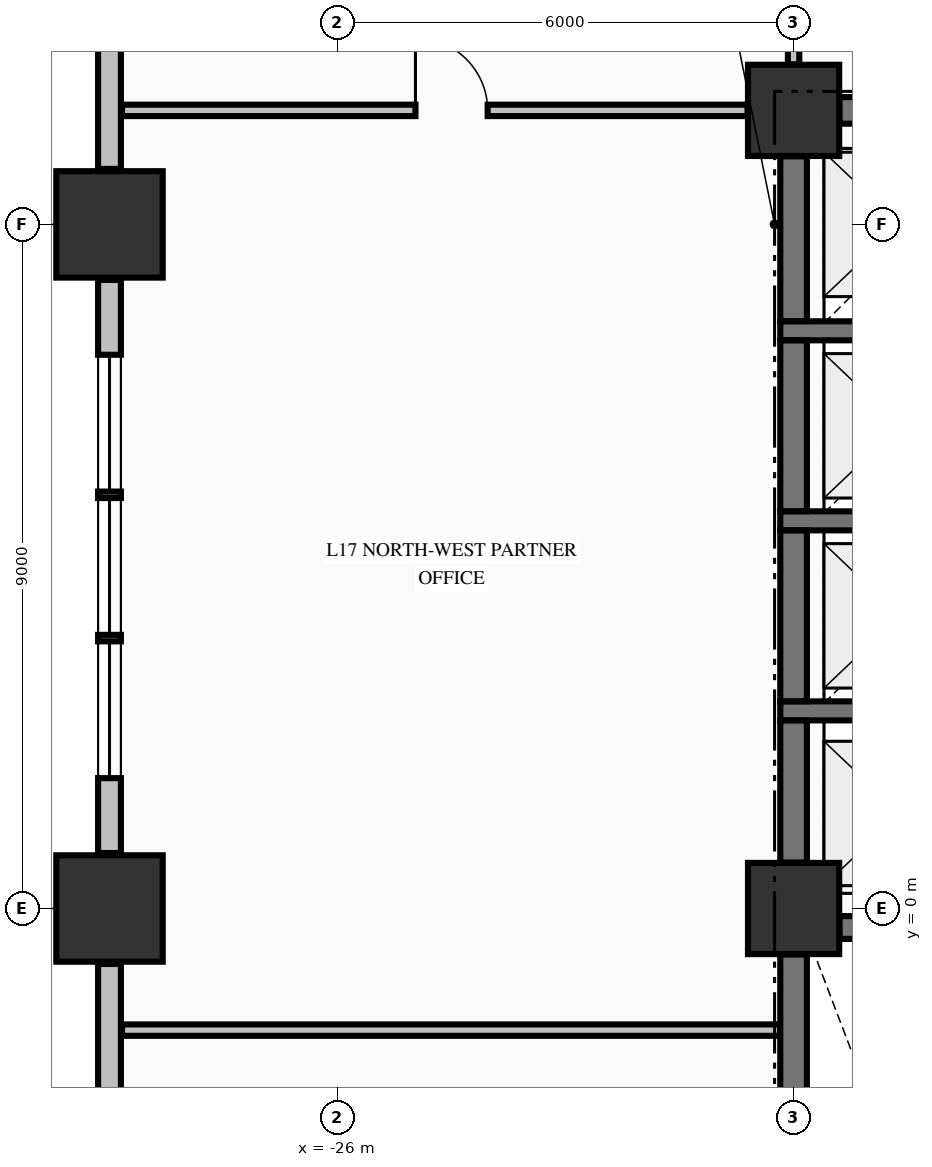
"""IFC4 building model, lengths in metres.
Left out: names, types, materials, properties, quantities, classifications, styles, units other than length and angle.
Written with IfcOpenShell. Run it as: python <this file> out.ifc"""

import sys

from ifc_helpers import new_model, si_unit, direction, frame, frame_2d, origin, origin_2d, place, context, subcontext, project, spatial, rectangle, extrude, element, fill, save


model = new_model("IFC4")
c1 = context("Model", 3, precision=1e-05, world=origin(), true_north=direction((0.0, 1.0)))
c2 = subcontext(c1, "Body", "Model", "MODEL_VIEW")
j1 = project(units=[si_unit("LENGTHUNIT", "METRE"), si_unit("PLANEANGLEUNIT", "RADIAN")], contexts=[c1])
p1 = place(None, origin())
s1 = spatial("IfcSite", under=j1, at=p1, CompositionType="ELEMENT")
p2 = place(p1, origin())
s2 = spatial("IfcBuilding", under=s1, at=p2, CompositionType="ELEMENT")
p3 = place(p2, frame((0.0, 0.0, 71.47)))
s3 = spatial("IfcBuildingStorey", under=s2, at=p3, CompositionType="ELEMENT", Elevation=71.47)
for number, where, z_axis, x_axis in (
    (1, (-29.0, 0.0, -0.325), (0.0, 0.0, 1.0), (1.0, 0.0, 0.0)),
    (2, (-29.0, 9.0, -0.325), (0.0, 0.0, 1.0), (1.0, 0.0, 0.0)),
):
    element("IfcColumn", number, at=place(p3, frame(where, z_axis=z_axis, x_axis=x_axis)), inside=s3, PredefinedType="COLUMN", context=c2, shape_type="SweptSolid", body=[
        extrude(rectangle(XDim=1.4, YDim=1.4, at=origin_2d()), origin(), (0.0, 0.0, 1.0), 3.645),
    ])
for number, where, z_axis, x_axis in (
    (3, (-20.0, 10.5, -0.325), (0.0, 0.0, 1.0), (1.0, 0.0, 0.0)),
    (4, (-20.0, 0.0, -0.325), (0.0, 0.0, 1.0), (1.0, 0.0, 0.0)),
):
    element("IfcColumn", number, at=place(p3, frame(where, z_axis=z_axis, x_axis=x_axis)), inside=s3, PredefinedType="COLUMN", context=c2, shape_type="SweptSolid", body=[
        extrude(rectangle(XDim=1.2, YDim=1.2, at=origin_2d()), origin(), (0.0, 0.0, 1.0), 3.645),
    ])
p4 = place(p3, frame((-29.0, -0.73, 0.0), z_axis=(0.0, 0.0, 1.0), x_axis=(0.0, -1.0, 0.0)))
e5 = element("IfcWall", 5, at=p4, inside=s3, PredefinedType="STANDARD", context=c2, shape_type="SweptSolid", body=[
    extrude(rectangle(XDim=7.54, YDim=0.3, at=frame_2d((3.77, 0.0))), origin(), (0.0, 0.0, 1.0), 2.712),
])
p5 = place(p4, frame((2.87, 0.0, 0.78)))
e6 = element("IfcOpeningElement", 6, at=p5, cuts=e5, PredefinedType="OPENING", context=c2, shape_type="SweptSolid", body=[
    extrude(rectangle(XDim=1.8, YDim=1.72, at=frame_2d((0.9, 0.86))), frame((0.0, 0.16, 0.0), z_axis=(0.0, -1.0, 0.0), x_axis=(1.0, 0.0, 0.0)), (0.0, 0.0, 1.0), 0.32),
])
p6 = place(p4, frame((4.755, 0.0, 0.78)))
e7 = element("IfcOpeningElement", 7, at=p6, cuts=e5, PredefinedType="OPENING", context=c2, shape_type="SweptSolid", body=[
    extrude(rectangle(XDim=1.8, YDim=1.72, at=frame_2d((0.9, 0.86))), frame((0.0, 0.16, 0.0), z_axis=(0.0, -1.0, 0.0), x_axis=(1.0, 0.0, 0.0)), (0.0, 0.0, 1.0), 0.32),
])
p7 = place(p3, frame((-29.0, 8.27, 0.0), z_axis=(0.0, 0.0, 1.0), x_axis=(0.0, -1.0, 0.0)))
e8 = element("IfcWall", 8, at=p7, inside=s3, PredefinedType="STANDARD", context=c2, shape_type="SweptSolid", body=[
    extrude(rectangle(XDim=7.54, YDim=0.3, at=frame_2d((3.77, 0.0))), origin(), (0.0, 0.0, 1.0), 2.712),
])
p8 = place(p7, frame((0.985, 0.0, 0.78)))
e9 = element("IfcOpeningElement", 9, at=p8, cuts=e8, PredefinedType="OPENING", context=c2, shape_type="SweptSolid", body=[
    extrude(rectangle(XDim=1.8, YDim=1.72, at=frame_2d((0.9, 0.86))), frame((0.0, 0.16, 0.0), z_axis=(0.0, -1.0, 0.0), x_axis=(1.0, 0.0, 0.0)), (0.0, 0.0, 1.0), 0.32),
])
p9 = place(p7, frame((2.87, 0.0, 0.78)))
e10 = element("IfcOpeningElement", 10, at=p9, cuts=e8, PredefinedType="OPENING", context=c2, shape_type="SweptSolid", body=[
    extrude(rectangle(XDim=1.8, YDim=1.72, at=frame_2d((0.9, 0.86))), frame((0.0, 0.16, 0.0), z_axis=(0.0, -1.0, 0.0), x_axis=(1.0, 0.0, 0.0)), (0.0, 0.0, 1.0), 0.32),
])
p10 = place(p7, frame((4.755, 0.0, 0.78)))
e11 = element("IfcOpeningElement", 11, at=p10, cuts=e8, PredefinedType="OPENING", context=c2, shape_type="SweptSolid", body=[
    extrude(rectangle(XDim=1.8, YDim=1.72, at=frame_2d((0.9, 0.86))), frame((0.0, 0.16, 0.0), z_axis=(0.0, -1.0, 0.0), x_axis=(1.0, 0.0, 0.0)), (0.0, 0.0, 1.0), 0.32),
])
p11 = place(p3, frame((-29.0, 22.27, 0.0), z_axis=(0.0, 0.0, 1.0), x_axis=(0.0, -1.0, 0.0)))
e12 = element("IfcWall", 12, at=p11, inside=s3, PredefinedType="STANDARD", context=c2, shape_type="SweptSolid", body=[
    extrude(rectangle(XDim=12.54, YDim=0.3, at=frame_2d((6.27, 0.0))), origin(), (0.0, 0.0, 1.0), 2.712),
])
p12 = place(p3, frame((-19.396, -0.25, 0.0), z_axis=(0.0, 0.0, 1.0), x_axis=(1.0, 0.0, 0.0)))
e13 = element("IfcWall", 13, at=p12, inside=s3, PredefinedType="SHEAR", context=c2, shape_type="SweptSolid", body=[
    extrude(rectangle(XDim=7.792, YDim=0.3, at=frame_2d((3.896, 0.0))), origin(), (0.0, 0.0, 1.0), 3.32),
])
p13 = place(p12, frame((5.696, 0.0, 0.0)))
e14 = element("IfcOpeningElement", 14, at=p13, cuts=e13, PredefinedType="OPENING", context=c2, shape_type="SweptSolid", body=[
    extrude(rectangle(XDim=1.1, YDim=2.15, at=frame_2d((0.55, 1.075))), frame((0.0, 0.16, 0.0), z_axis=(0.0, -1.0, 0.0), x_axis=(1.0, 0.0, 0.0)), (0.0, 0.0, 1.0), 0.32),
])
for number, where, z_axis, x_axis in (
    (15, (-20.175, 2.6, 0.0), (0.0, 0.0, 1.0), (1.0, 0.0, 0.0)),
    (16, (-20.175, 5.1, 0.0), (0.0, 0.0, 1.0), (1.0, 0.0, 0.0)),
    (17, (-20.175, 7.6, 0.0), (0.0, 0.0, 1.0), (1.0, 0.0, 0.0)),
):
    element("IfcWall", number, at=place(p3, frame(where, z_axis=z_axis, x_axis=x_axis)), inside=s3, PredefinedType="SOLIDWALL", context=c2, shape_type="SweptSolid", body=[
        extrude(rectangle(XDim=3.1, YDim=0.25, at=frame_2d((1.55, 0.0))), origin(), (0.0, 0.0, 1.0), 3.32),
    ])
p14 = place(p3, frame((-19.396, 10.5, 0.0), z_axis=(0.0, 0.0, 1.0), x_axis=(1.0, 0.0, 0.0)))
e18 = element("IfcWall", 18, at=p14, inside=s3, PredefinedType="SHEAR", context=c2, shape_type="SweptSolid", body=[
    extrude(rectangle(XDim=4.696, YDim=0.35, at=frame_2d((2.348, 0.0))), origin(), (0.0, 0.0, 1.0), 3.32),
])
p15 = place(p14, frame((2.796, 0.0, 0.0)))
e19 = element("IfcOpeningElement", 19, at=p15, cuts=e18, PredefinedType="OPENING", context=c2, shape_type="SweptSolid", body=[
    extrude(rectangle(XDim=1.2, YDim=2.15, at=frame_2d((0.6, 1.075))), frame((0.0, 0.185, 0.0), z_axis=(0.0, -1.0, 0.0), x_axis=(1.0, 0.0, 0.0)), (0.0, 0.0, 1.0), 0.37),
])
p16 = place(p3, frame((-28.835, -1.6, 0.0), z_axis=(0.0, 0.0, 1.0), x_axis=(1.0, 0.0, 0.0)))
e20 = element("IfcWall", 20, at=p16, inside=s3, PredefinedType="PARTITIONING", context=c2, shape_type="SweptSolid", body=[
    extrude(rectangle(XDim=8.657, YDim=0.15, at=frame_2d((4.329, 0.0))), origin(), (0.0, 0.0, 1.0), 3.32),
])
p17 = place(p3, frame((-28.835, 10.5, 0.0), z_axis=(0.0, 0.0, 1.0), x_axis=(1.0, 0.0, 0.0)))
e21 = element("IfcWall", 21, at=p17, inside=s3, PredefinedType="PARTITIONING", context=c2, shape_type="SweptSolid", body=[
    extrude(rectangle(XDim=8.229, YDim=0.15, at=frame_2d((4.115, 0.0))), origin(), (0.0, 0.0, 1.0), 3.32),
])
p18 = place(p17, frame((3.86, 0.0, 0.0)))
e22 = element("IfcOpeningElement", 22, at=p18, cuts=e21, PredefinedType="OPENING", context=c2, shape_type="SweptSolid", body=[
    extrude(rectangle(XDim=0.95, YDim=2.15, at=frame_2d((0.475, 1.075))), frame((0.0, 0.085, 0.0), z_axis=(0.0, -1.0, 0.0), x_axis=(1.0, 0.0, 0.0)), (0.0, 0.0, 1.0), 0.17),
])
p19 = place(p3, frame((-20.0, -9.346, 0.0), z_axis=(0.0, 0.0, 1.0), x_axis=(0.0, 1.0, 0.0)))
e23 = element("IfcWall", 23, at=p19, inside=s3, PredefinedType="SHEAR", context=c2, shape_type="SweptSolid", body=[
    extrude(rectangle(XDim=8.742, YDim=0.35, at=frame_2d((4.371, 0.0))), origin(), (0.0, 0.0, 1.0), 3.32),
])
p20 = place(p3, frame((-20.0, 0.604, 0.0), z_axis=(0.0, 0.0, 1.0), x_axis=(0.0, 1.0, 0.0)))
e24 = element("IfcWall", 24, at=p20, inside=s3, PredefinedType="SHEAR", context=c2, shape_type="SweptSolid", body=[
    extrude(rectangle(XDim=1.869, YDim=0.35, at=frame_2d((0.935, 0.0))), origin(), (0.0, 0.0, 1.0), 3.32),
])
for number, where, z_axis, x_axis in (
    (25, (-20.0, 2.727, 0.0), (0.0, 0.0, 1.0), (0.0, 1.0, 0.0)),
    (26, (-20.0, 5.227, 0.0), (0.0, 0.0, 1.0), (0.0, 1.0, 0.0)),
):
    element("IfcWall", number, at=place(p3, frame(where, z_axis=z_axis, x_axis=x_axis)), inside=s3, PredefinedType="SHEAR", context=c2, shape_type="SweptSolid", body=[
        extrude(rectangle(XDim=2.246, YDim=0.35, at=frame_2d((1.123, 0.0))), origin(), (0.0, 0.0, 1.0), 3.32),
    ])
p21 = place(p3, frame((-20.0, 7.727, 0.0), z_axis=(0.0, 0.0, 1.0), x_axis=(0.0, 1.0, 0.0)))
e27 = element("IfcWall", 27, at=p21, inside=s3, PredefinedType="SHEAR", context=c2, shape_type="SweptSolid", body=[
    extrude(rectangle(XDim=2.169, YDim=0.35, at=frame_2d((1.084, 0.0))), origin(), (0.0, 0.0, 1.0), 3.32),
])
p22 = place(p3, frame((-20.0, 11.106, 0.0), z_axis=(0.0, 0.0, 1.0), x_axis=(0.0, 1.0, 0.0)))
e28 = element("IfcWall", 28, at=p22, inside=s3, PredefinedType="PARTITIONING", context=c2, shape_type="SweptSolid", body=[
    extrude(rectangle(XDim=2.616, YDim=0.15, at=frame_2d((1.308, 0.0))), origin(), (0.0, 0.0, 1.0), 2.66),
])
p23 = place(p22, frame((0.569, 0.0, 0.0)))
e29 = element("IfcOpeningElement", 29, at=p23, cuts=e28, PredefinedType="OPENING", context=c2, shape_type="SweptSolid", body=[
    extrude(rectangle(XDim=0.95, YDim=2.15, at=frame_2d((0.475, 1.075))), frame((0.0, 0.085, 0.0), z_axis=(0.0, -1.0, 0.0), x_axis=(1.0, 0.0, 0.0)), (0.0, 0.0, 1.0), 0.17),
])
p24 = place(p8, origin())
e30 = element("IfcWindow", 30, at=p24, inside=s3, PartitioningType="SINGLE_PANEL", PredefinedType="WINDOW", context=c2, shape_type="SweptSolid", body=[
    extrude(rectangle(XDim=1.8, YDim=1.72, at=frame_2d((0.9, 0.86))), frame((0.0, 0.03, 0.0), z_axis=(0.0, -1.0, 0.0), x_axis=(1.0, 0.0, 0.0)), (0.0, 0.0, 1.0), 0.06),
])
fill(e9, e30)
p25 = place(p9, origin())
e31 = element("IfcWindow", 31, at=p25, inside=s3, PartitioningType="SINGLE_PANEL", PredefinedType="WINDOW", context=c2, shape_type="SweptSolid", body=[
    extrude(rectangle(XDim=1.8, YDim=1.72, at=frame_2d((0.9, 0.86))), frame((0.0, 0.03, 0.0), z_axis=(0.0, -1.0, 0.0), x_axis=(1.0, 0.0, 0.0)), (0.0, 0.0, 1.0), 0.06),
])
fill(e10, e31)
p26 = place(p10, origin())
e32 = element("IfcWindow", 32, at=p26, inside=s3, PartitioningType="SINGLE_PANEL", PredefinedType="WINDOW", context=c2, shape_type="SweptSolid", body=[
    extrude(rectangle(XDim=1.8, YDim=1.72, at=frame_2d((0.9, 0.86))), frame((0.0, 0.03, 0.0), z_axis=(0.0, -1.0, 0.0), x_axis=(1.0, 0.0, 0.0)), (0.0, 0.0, 1.0), 0.06),
])
fill(e11, e32)
p27 = place(p18, origin())
e33 = element("IfcDoor", 33, at=p27, inside=s3, OperationType="SINGLE_SWING_LEFT", PredefinedType="DOOR", context=c2, shape_type="SweptSolid", body=[
    extrude(rectangle(XDim=0.95, YDim=2.15, at=frame_2d((0.475, 1.075))), frame((0.0, 0.025, 0.0), z_axis=(0.0, -1.0, 0.0), x_axis=(1.0, 0.0, 0.0)), (0.0, 0.0, 1.0), 0.05),
])
fill(e22, e33)
save(model, sys.argv[1])
